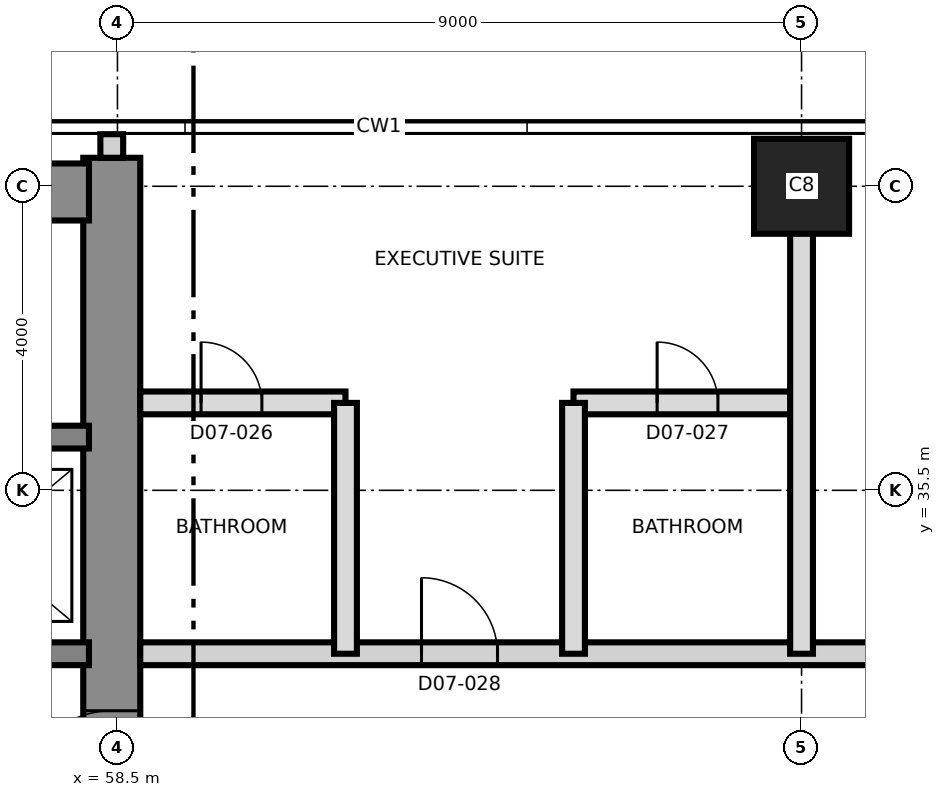
"""IFC4 building model, lengths in metres.
Left out: names, types, materials, properties, quantities, classifications, styles, units other than length and angle.
Written with IfcOpenShell. Run it as: python <this file> out.ifc"""

import sys

from ifc_helpers import new_model, si_unit, direction, frame, frame_2d, origin, origin_2d, place, context, subcontext, project, spatial, rectangle, extrude, element, fill, save


model = new_model("IFC4")
c1 = context("Model", 3, precision=1e-05, world=origin(), true_north=direction((0.0, 1.0)))
c2 = subcontext(c1, "Body", "Model", "MODEL_VIEW")
j1 = project(units=[si_unit("LENGTHUNIT", "METRE"), si_unit("PLANEANGLEUNIT", "RADIAN")], contexts=[c1])
p1 = place(None, origin())
s1 = spatial("IfcSite", under=j1, at=p1, CompositionType="ELEMENT")
p2 = place(p1, origin())
s2 = spatial("IfcBuilding", under=s1, at=p2, CompositionType="ELEMENT")
p3 = place(p2, frame((0.0, 0.0, 90.8)))
s3 = spatial("IfcBuildingStorey", under=s2, at=p3, CompositionType="ELEMENT", Elevation=90.8)
p4 = place(p3, frame((58.425, 21.125, 0.0), z_axis=(0.0, 0.0, 1.0), x_axis=(0.0, 1.0, 0.0)))
e1 = element("IfcWall", 1, at=p4, inside=s3, PredefinedType="SHEAR", context=c2, shape_type="SweptSolid", body=[
    extrude(rectangle(XDim=18.75, YDim=0.75, at=frame_2d((9.375, 0.0))), origin(), (0.0, 0.0, 1.0), 3.7),
])
p5 = place(p4, frame((10.275, 0.0, 0.0)))
e2 = element("IfcOpeningElement", 2, at=p5, cuts=e1, PredefinedType="OPENING", context=c2, shape_type="SweptSolid", body=[
    extrude(rectangle(XDim=1.2, YDim=2.1, at=frame_2d((0.6, 1.05))), frame((0.0, 0.385, 0.0), z_axis=(0.0, -1.0, 0.0), x_axis=(1.0, 0.0, 0.0)), (0.0, 0.0, 1.0), 0.77),
])
p6 = place(p3, frame((31.125, 39.425, 0.0), z_axis=(0.0, 0.0, 1.0), x_axis=(1.0, 0.0, 0.0)))
e3 = element("IfcWall", 3, at=p6, inside=s3, PredefinedType="SHEAR", context=c2, shape_type="SweptSolid", body=[
    extrude(rectangle(XDim=27.0, YDim=0.75, at=frame_2d((13.5, 0.0))), origin(), (0.0, 0.0, 1.0), 3.7),
])
p7 = place(p6, frame((10.575, 0.0, 0.0)))
e4 = element("IfcOpeningElement", 4, at=p7, cuts=e3, PredefinedType="OPENING", context=c2, shape_type="SweptSolid", body=[
    extrude(rectangle(XDim=1.2, YDim=2.1, at=frame_2d((0.6, 1.05))), frame((0.0, 0.385, 0.0), z_axis=(0.0, -1.0, 0.0), x_axis=(1.0, 0.0, 0.0)), (0.0, 0.0, 1.0), 0.77),
])
p8 = place(p3, frame((31.875, 33.35, 0.0), z_axis=(0.0, 0.0, 1.0), x_axis=(1.0, 0.0, 0.0)))
e5 = element("IfcWall", 5, at=p8, inside=s3, PredefinedType="SHEAR", context=c2, shape_type="SweptSolid", body=[
    extrude(rectangle(XDim=26.25, YDim=0.3, at=frame_2d((13.125, 0.0))), origin(), (0.0, 0.0, 1.0), 3.7),
])
p9 = place(p8, frame((13.775, 0.0, 0.0)))
e6 = element("IfcOpeningElement", 6, at=p9, cuts=e5, PredefinedType="OPENING", context=c2, shape_type="SweptSolid", body=[
    extrude(rectangle(XDim=1.4, YDim=2.1, at=frame_2d((0.7, 1.05))), frame((0.0, 0.16, 0.0), z_axis=(0.0, -1.0, 0.0), x_axis=(1.0, 0.0, 0.0)), (0.0, 0.0, 1.0), 0.32),
])
p10 = place(p8, frame((5.25, 0.0, 0.0)))
e7 = element("IfcOpeningElement", 7, at=p10, cuts=e5, PredefinedType="OPENING", context=c2, shape_type="SweptSolid", body=[
    extrude(rectangle(XDim=1.2, YDim=2.1, at=frame_2d((0.6, 1.05))), frame((0.0, 0.16, 0.0), z_axis=(0.0, -1.0, 0.0), x_axis=(1.0, 0.0, 0.0)), (0.0, 0.0, 1.0), 0.32),
])
p11 = place(p8, frame((19.8, 0.0, 0.0)))
e8 = element("IfcOpeningElement", 8, at=p11, cuts=e5, PredefinedType="OPENING", context=c2, shape_type="SweptSolid", body=[
    extrude(rectangle(XDim=1.2, YDim=2.1, at=frame_2d((0.6, 1.05))), frame((0.0, 0.16, 0.0), z_axis=(0.0, -1.0, 0.0), x_axis=(1.0, 0.0, 0.0)), (0.0, 0.0, 1.0), 0.32),
])
p12 = place(p3, frame((43.5, 36.2, 0.0), z_axis=(0.0, 0.0, 1.0), x_axis=(1.0, 0.0, 0.0)))
e9 = element("IfcWall", 9, at=p12, inside=s3, PredefinedType="SHEAR", context=c2, shape_type="SweptSolid", body=[
    extrude(rectangle(XDim=14.625, YDim=0.3, at=frame_2d((7.312, 0.0))), origin(), (0.0, 0.0, 1.0), 3.7),
])
p13 = place(p12, frame((6.9, 0.0, 0.0)))
e10 = element("IfcOpeningElement", 10, at=p13, cuts=e9, PredefinedType="OPENING", context=c2, shape_type="SweptSolid", body=[
    extrude(rectangle(XDim=1.2, YDim=2.1, at=frame_2d((0.6, 1.05))), frame((0.0, 0.16, 0.0), z_axis=(0.0, -1.0, 0.0), x_axis=(1.0, 0.0, 0.0)), (0.0, 0.0, 1.0), 0.32),
])
p14 = place(p12, frame((0.7, 0.0, 0.0)))
e11 = element("IfcOpeningElement", 11, at=p14, cuts=e9, PredefinedType="OPENING", context=c2, shape_type="SweptSolid", body=[
    extrude(rectangle(XDim=1.3, YDim=2.4, at=frame_2d((0.65, 1.2))), frame((0.0, 0.16, 0.0), z_axis=(0.0, -1.0, 0.0), x_axis=(1.0, 0.0, 0.0)), (0.0, 0.0, 1.0), 0.32),
])
p15 = place(p12, frame((3.7, 0.0, 0.0)))
e12 = element("IfcOpeningElement", 12, at=p15, cuts=e9, PredefinedType="OPENING", context=c2, shape_type="SweptSolid", body=[
    extrude(rectangle(XDim=1.3, YDim=2.4, at=frame_2d((0.65, 1.2))), frame((0.0, 0.16, 0.0), z_axis=(0.0, -1.0, 0.0), x_axis=(1.0, 0.0, 0.0)), (0.0, 0.0, 1.0), 0.32),
])
p16 = place(p3, frame((67.5, 39.5, 0.0), z_axis=(0.0, 0.0, 1.0), x_axis=(1.0, 0.0, 0.0)))
e13 = element("IfcColumn", 13, at=p16, inside=s3, PredefinedType="COLUMN", context=c2, shape_type="SweptSolid", body=[
    extrude(rectangle(XDim=1.25, YDim=1.25, at=origin_2d()), origin(), (0.0, 0.0, 1.0), 3.7),
])
p17 = place(p3, frame((58.8, 33.35, 0.0), z_axis=(0.0, 0.0, 1.0), x_axis=(1.0, 0.0, 0.0)))
e14 = element("IfcWall", 14, at=p17, inside=s3, PredefinedType="PARTITIONING", context=c2, shape_type="SweptSolid", body=[
    extrude(rectangle(XDim=26.53, YDim=0.3, at=frame_2d((13.265, 0.0))), origin(), (0.0, 0.0, 1.0), 3.4),
])
p18 = place(p17, frame((3.7, 0.0, 0.0)))
e15 = element("IfcOpeningElement", 15, at=p18, cuts=e14, PredefinedType="OPENING", context=c2, shape_type="SweptSolid", body=[
    extrude(rectangle(XDim=1.0, YDim=2.4, at=frame_2d((0.5, 1.2))), frame((0.0, 0.16, 0.0), z_axis=(0.0, -1.0, 0.0), x_axis=(1.0, 0.0, 0.0)), (0.0, 0.0, 1.0), 0.32),
])
p19 = place(p17, frame((9.85, 0.0, 0.0)))
e16 = element("IfcOpeningElement", 16, at=p19, cuts=e14, PredefinedType="OPENING", context=c2, shape_type="SweptSolid", body=[
    extrude(rectangle(XDim=1.0, YDim=2.1, at=frame_2d((0.5, 1.05))), frame((0.0, 0.16, 0.0), z_axis=(0.0, -1.0, 0.0), x_axis=(1.0, 0.0, 0.0)), (0.0, 0.0, 1.0), 0.32),
])
p20 = place(p17, frame((15.7, 0.0, 0.0)))
e17 = element("IfcOpeningElement", 17, at=p20, cuts=e14, PredefinedType="OPENING", context=c2, shape_type="SweptSolid", body=[
    extrude(rectangle(XDim=1.0, YDim=2.1, at=frame_2d((0.5, 1.05))), frame((0.0, 0.16, 0.0), z_axis=(0.0, -1.0, 0.0), x_axis=(1.0, 0.0, 0.0)), (0.0, 0.0, 1.0), 0.32),
])
p21 = place(p17, frame((21.7, 0.0, 0.0)))
e18 = element("IfcOpeningElement", 18, at=p21, cuts=e14, PredefinedType="OPENING", context=c2, shape_type="SweptSolid", body=[
    extrude(rectangle(XDim=1.0, YDim=2.4, at=frame_2d((0.5, 1.2))), frame((0.0, 0.16, 0.0), z_axis=(0.0, -1.0, 0.0), x_axis=(1.0, 0.0, 0.0)), (0.0, 0.0, 1.0), 0.32),
])
p22 = place(p3, frame((58.8, 36.65, 0.0), z_axis=(0.0, 0.0, 1.0), x_axis=(1.0, 0.0, 0.0)))
e19 = element("IfcWall", 19, at=p22, inside=s3, PredefinedType="PARTITIONING", context=c2, shape_type="SweptSolid", body=[
    extrude(rectangle(XDim=2.7, YDim=0.3, at=frame_2d((1.35, 0.0))), origin(), (0.0, 0.0, 1.0), 3.4),
])
p23 = place(p22, frame((0.8, 0.0, 0.0)))
e20 = element("IfcOpeningElement", 20, at=p23, cuts=e19, PredefinedType="OPENING", context=c2, shape_type="SweptSolid", body=[
    extrude(rectangle(XDim=0.8, YDim=2.1, at=frame_2d((0.4, 1.05))), frame((0.0, 0.16, 0.0), z_axis=(0.0, -1.0, 0.0), x_axis=(1.0, 0.0, 0.0)), (0.0, 0.0, 1.0), 0.32),
])
p24 = place(p3, frame((64.5, 36.65, 0.0), z_axis=(0.0, 0.0, 1.0), x_axis=(1.0, 0.0, 0.0)))
e21 = element("IfcWall", 21, at=p24, inside=s3, PredefinedType="PARTITIONING", context=c2, shape_type="SweptSolid", body=[
    extrude(rectangle(XDim=3.0, YDim=0.3, at=frame_2d((1.5, 0.0))), origin(), (0.0, 0.0, 1.0), 3.4),
])
p25 = place(p24, frame((1.1, 0.0, 0.0)))
e22 = element("IfcOpeningElement", 22, at=p25, cuts=e21, PredefinedType="OPENING", context=c2, shape_type="SweptSolid", body=[
    extrude(rectangle(XDim=0.8, YDim=2.1, at=frame_2d((0.4, 1.05))), frame((0.0, 0.16, 0.0), z_axis=(0.0, -1.0, 0.0), x_axis=(1.0, 0.0, 0.0)), (0.0, 0.0, 1.0), 0.32),
])
for number, where, z_axis, x_axis in (
    (23, (61.5, 33.35, 0.0), (0.0, 0.0, 1.0), (0.0, 1.0, 0.0)),
    (24, (64.5, 33.35, 0.0), (0.0, 0.0, 1.0), (0.0, 1.0, 0.0)),
):
    element("IfcWall", number, at=place(p3, frame(where, z_axis=z_axis, x_axis=x_axis)), inside=s3, PredefinedType="PARTITIONING", context=c2, shape_type="SweptSolid", body=[
        extrude(rectangle(XDim=3.3, YDim=0.3, at=frame_2d((1.65, 0.0))), origin(), (0.0, 0.0, 1.0), 3.4),
    ])
p26 = place(p3, frame((67.5, 33.35, 0.0), z_axis=(0.0, 0.0, 1.0), x_axis=(0.0, 1.0, 0.0)))
e25 = element("IfcWall", 25, at=p26, inside=s3, PredefinedType="PARTITIONING", context=c2, shape_type="SweptSolid", body=[
    extrude(rectangle(XDim=6.655, YDim=0.3, at=frame_2d((3.327, 0.0))), origin(), (0.0, 0.0, 1.0), 3.4),
])
p27 = place(p3, frame((58.425, 39.875, 0.0), z_axis=(0.0, 0.0, 1.0), x_axis=(0.0, 1.0, 0.0)))
e26 = element("IfcWall", 26, at=p27, inside=s3, PredefinedType="PARTITIONING", context=c2, shape_type="SweptSolid", body=[
    extrude(rectangle(XDim=0.31, YDim=0.3, at=frame_2d((0.155, 0.0))), origin(), (0.0, 0.0, 1.0), 3.4),
])
p28 = place(p5, origin())
e27 = element("IfcDoor", 27, at=p28, inside=s3, OperationType="SINGLE_SWING_LEFT", PredefinedType="DOOR", context=c2, shape_type="SweptSolid", body=[
    extrude(rectangle(XDim=1.2, YDim=2.1, at=frame_2d((0.6, 1.05))), frame((0.0, 0.025, 0.0), z_axis=(0.0, -1.0, 0.0), x_axis=(1.0, 0.0, 0.0)), (0.0, 0.0, 1.0), 0.05),
])
fill(e2, e27)
p29 = place(p23, origin())
e28 = element("IfcDoor", 28, at=p29, inside=s3, OperationType="SINGLE_SWING_LEFT", PredefinedType="DOOR", context=c2, shape_type="SweptSolid", body=[
    extrude(rectangle(XDim=0.8, YDim=2.1, at=frame_2d((0.4, 1.05))), frame((0.0, 0.025, 0.0), z_axis=(0.0, -1.0, 0.0), x_axis=(1.0, 0.0, 0.0)), (0.0, 0.0, 1.0), 0.05),
])
fill(e20, e28)
p30 = place(p25, origin())
e29 = element("IfcDoor", 29, at=p30, inside=s3, OperationType="SINGLE_SWING_RIGHT", PredefinedType="DOOR", context=c2, shape_type="SweptSolid", body=[
    extrude(rectangle(XDim=0.8, YDim=2.1, at=frame_2d((0.4, 1.05))), frame((0.0, 0.025, 0.0), z_axis=(0.0, -1.0, 0.0), x_axis=(1.0, 0.0, 0.0)), (0.0, 0.0, 1.0), 0.05),
])
fill(e22, e29)
p31 = place(p18, origin())
e30 = element("IfcDoor", 30, at=p31, inside=s3, OperationType="SINGLE_SWING_LEFT", PredefinedType="DOOR", context=c2, shape_type="SweptSolid", body=[
    extrude(rectangle(XDim=1.0, YDim=2.4, at=frame_2d((0.5, 1.2))), frame((0.0, 0.025, 0.0), z_axis=(0.0, -1.0, 0.0), x_axis=(1.0, 0.0, 0.0)), (0.0, 0.0, 1.0), 0.05),
])
fill(e15, e30)
save(model, sys.argv[1])
